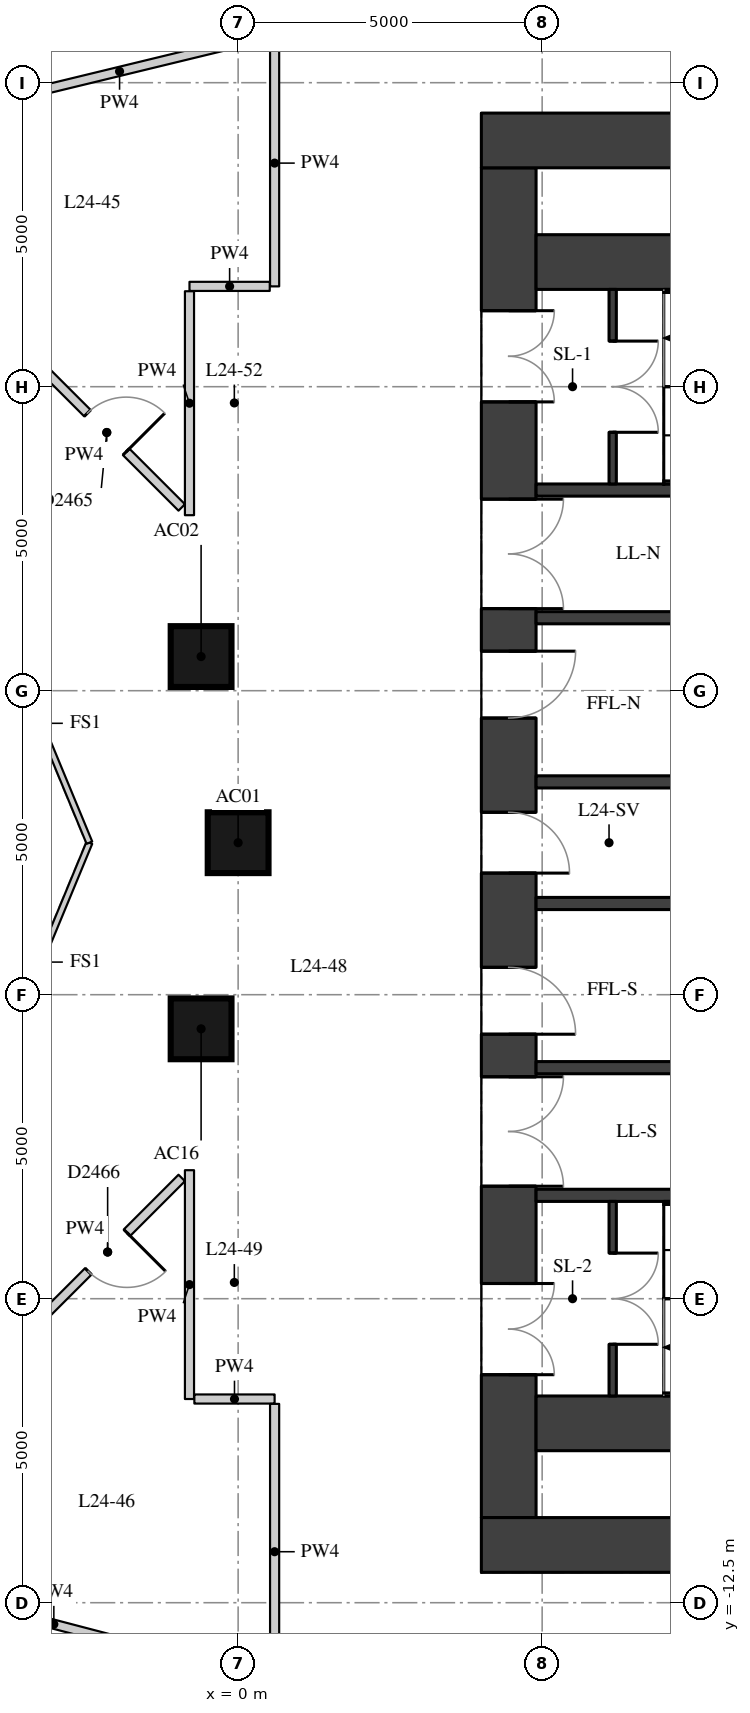
"""IFC4 building model, lengths in metres.
Left out: names, types, materials, properties, quantities, classifications, styles, units other than length and angle.
Written with IfcOpenShell. Run it as: python <this file> out.ifc"""

import sys

from ifc_helpers import new_model, si_unit, direction, frame, frame_2d, origin, origin_2d, place, context, subcontext, project, spatial, rectangle, extrude, element, fill, save


model = new_model("IFC4")
c1 = context("Model", 3, precision=1e-05, world=origin(), true_north=direction((0.0, 1.0)))
c2 = subcontext(c1, "Body", "Model", "MODEL_VIEW")
j1 = project(units=[si_unit("LENGTHUNIT", "METRE"), si_unit("PLANEANGLEUNIT", "RADIAN")], contexts=[c1])
p1 = place(None, origin())
s1 = spatial("IfcSite", under=j1, at=p1, CompositionType="ELEMENT")
p2 = place(p1, origin())
s2 = spatial("IfcBuilding", under=s1, at=p2, CompositionType="ELEMENT")
p3 = place(p2, frame((0.0, 0.0, 88.9)))
s3 = spatial("IfcBuildingStorey", under=s2, at=p3, CompositionType="ELEMENT", Elevation=88.9)
for number, where, z_axis, x_axis in (
    (1, (0.0, 0.0, 0.0), (0.0, 0.0, 1.0), (1.0, 0.0, 0.0)),
    (2, (-0.609, 3.062, 0.0), (0.0, 0.0, 1.0), (1.0, 0.0, 0.0)),
    (3, (-0.609, -3.062, 0.0), (0.0, 0.0, 1.0), (1.0, 0.0, 0.0)),
):
    element("IfcColumn", number, at=place(p3, frame(where, z_axis=z_axis, x_axis=x_axis)), inside=s3, PredefinedType="COLUMN", context=c2, shape_type="SweptSolid", body=[
        extrude(rectangle(XDim=1.0, YDim=1.0, at=origin_2d()), origin(), (0.0, 0.0, 1.0), 3.3),
    ])
p4 = place(p3, frame((4.45, -11.1, 0.0), z_axis=(0.0, 0.0, 1.0), x_axis=(0.0, 1.0, 0.0)))
e4 = element("IfcWall", 4, at=p4, inside=s3, PredefinedType="SHEAR", context=c2, shape_type="SweptSolid", body=[
    extrude(rectangle(XDim=22.2, YDim=0.9, at=frame_2d((11.1, 0.0))), origin(), (0.0, 0.0, 1.0), 3.02),
])
p5 = place(p4, frame((2.35, 0.0, 0.0)))
e5 = element("IfcOpeningElement", 5, at=p5, cuts=e4, PredefinedType="OPENING", context=c2, shape_type="SweptSolid", body=[
    extrude(rectangle(XDim=1.5, YDim=2.1, at=frame_2d((0.75, 1.05))), frame((0.0, 0.46, 0.0), z_axis=(0.0, -1.0, 0.0), x_axis=(1.0, 0.0, 0.0)), (0.0, 0.0, 1.0), 0.92),
])
p6 = place(p4, frame((5.45, 0.0, 0.0)))
e6 = element("IfcOpeningElement", 6, at=p6, cuts=e4, PredefinedType="OPENING", context=c2, shape_type="SweptSolid", body=[
    extrude(rectangle(XDim=1.8, YDim=2.1, at=frame_2d((0.9, 1.05))), frame((0.0, 0.46, 0.0), z_axis=(0.0, -1.0, 0.0), x_axis=(1.0, 0.0, 0.0)), (0.0, 0.0, 1.0), 0.92),
])
p7 = place(p4, frame((7.95, 0.0, 0.0)))
e7 = element("IfcOpeningElement", 7, at=p7, cuts=e4, PredefinedType="OPENING", context=c2, shape_type="SweptSolid", body=[
    extrude(rectangle(XDim=1.1, YDim=2.1, at=frame_2d((0.55, 1.05))), frame((0.0, 0.46, 0.0), z_axis=(0.0, -1.0, 0.0), x_axis=(1.0, 0.0, 0.0)), (0.0, 0.0, 1.0), 0.92),
])
p8 = place(p4, frame((10.6, 0.0, 0.0)))
e8 = element("IfcOpeningElement", 8, at=p8, cuts=e4, PredefinedType="OPENING", context=c2, shape_type="SweptSolid", body=[
    extrude(rectangle(XDim=1.0, YDim=2.1, at=frame_2d((0.5, 1.05))), frame((0.0, 0.46, 0.0), z_axis=(0.0, -1.0, 0.0), x_axis=(1.0, 0.0, 0.0)), (0.0, 0.0, 1.0), 0.92),
])
p9 = place(p4, frame((13.15, 0.0, 0.0)))
e9 = element("IfcOpeningElement", 9, at=p9, cuts=e4, PredefinedType="OPENING", context=c2, shape_type="SweptSolid", body=[
    extrude(rectangle(XDim=1.1, YDim=2.1, at=frame_2d((0.55, 1.05))), frame((0.0, 0.46, 0.0), z_axis=(0.0, -1.0, 0.0), x_axis=(1.0, 0.0, 0.0)), (0.0, 0.0, 1.0), 0.92),
])
p10 = place(p4, frame((14.95, 0.0, 0.0)))
e10 = element("IfcOpeningElement", 10, at=p10, cuts=e4, PredefinedType="OPENING", context=c2, shape_type="SweptSolid", body=[
    extrude(rectangle(XDim=1.8, YDim=2.1, at=frame_2d((0.9, 1.05))), frame((0.0, 0.46, 0.0), z_axis=(0.0, -1.0, 0.0), x_axis=(1.0, 0.0, 0.0)), (0.0, 0.0, 1.0), 0.92),
])
p11 = place(p4, frame((18.35, 0.0, 0.0)))
e11 = element("IfcOpeningElement", 11, at=p11, cuts=e4, PredefinedType="OPENING", context=c2, shape_type="SweptSolid", body=[
    extrude(rectangle(XDim=1.5, YDim=2.1, at=frame_2d((0.75, 1.05))), frame((0.0, 0.46, 0.0), z_axis=(0.0, -1.0, 0.0), x_axis=(1.0, 0.0, 0.0)), (0.0, 0.0, 1.0), 0.92),
])
for number, where, z_axis, x_axis in (
    (12, (4.0, 11.55, 0.0), (0.0, 0.0, 1.0), (1.0, 0.0, 0.0)),
    (13, (4.0, -11.55, 0.0), (0.0, 0.0, 1.0), (1.0, 0.0, 0.0)),
):
    element("IfcWall", number, at=place(p3, frame(where, z_axis=z_axis, x_axis=x_axis)), inside=s3, PredefinedType="SHEAR", context=c2, shape_type="SweptSolid", body=[
        extrude(rectangle(XDim=15.2, YDim=0.9, at=frame_2d((7.6, 0.0))), origin(), (0.0, 0.0, 1.0), 3.02),
    ])
for number, where, z_axis, x_axis in (
    (14, (4.9, 9.55, 0.0), (0.0, 0.0, 1.0), (1.0, 0.0, 0.0)),
    (15, (4.9, -9.55, 0.0), (0.0, 0.0, 1.0), (1.0, 0.0, 0.0)),
):
    element("IfcWall", number, at=place(p3, frame(where, z_axis=z_axis, x_axis=x_axis)), inside=s3, PredefinedType="SHEAR", context=c2, shape_type="SweptSolid", body=[
        extrude(rectangle(XDim=10.2, YDim=0.9, at=frame_2d((5.1, 0.0))), origin(), (0.0, 0.0, 1.0), 3.02),
    ])
p12 = place(p3, frame((4.9, 5.8, 0.0), z_axis=(0.0, 0.0, 1.0), x_axis=(1.0, 0.0, 0.0)))
e16 = element("IfcWall", 16, at=p12, inside=s3, PredefinedType="SHEAR", context=c2, shape_type="SweptSolid", body=[
    extrude(rectangle(XDim=10.2, YDim=0.2, at=frame_2d((5.1, 0.0))), origin(), (0.0, 0.0, 1.0), 3.02),
])
p13 = place(p12, frame((6.75, 0.0, 0.0)))
e17 = element("IfcOpeningElement", 17, at=p13, cuts=e16, PredefinedType="OPENING", context=c2, shape_type="SweptSolid", body=[
    extrude(rectangle(XDim=1.1, YDim=2.1, at=frame_2d((0.55, 1.05))), frame((0.0, 0.11, 0.0), z_axis=(0.0, -1.0, 0.0), x_axis=(1.0, 0.0, 0.0)), (0.0, 0.0, 1.0), 0.22),
])
p14 = place(p12, frame((8.75, 0.0, 0.0)))
e18 = element("IfcOpeningElement", 18, at=p14, cuts=e16, PredefinedType="OPENING", context=c2, shape_type="SweptSolid", body=[
    extrude(rectangle(XDim=1.1, YDim=2.1, at=frame_2d((0.55, 1.05))), frame((0.0, 0.11, 0.0), z_axis=(0.0, -1.0, 0.0), x_axis=(1.0, 0.0, 0.0)), (0.0, 0.0, 1.0), 0.22),
])
p15 = place(p3, frame((4.9, 3.7, 0.0), z_axis=(0.0, 0.0, 1.0), x_axis=(1.0, 0.0, 0.0)))
e19 = element("IfcWall", 19, at=p15, inside=s3, PredefinedType="SHEAR", context=c2, shape_type="SweptSolid", body=[
    extrude(rectangle(XDim=10.2, YDim=0.2, at=frame_2d((5.1, 0.0))), origin(), (0.0, 0.0, 1.0), 3.02),
])
p16 = place(p15, frame((6.3, 0.0, 0.0)))
e20 = element("IfcOpeningElement", 20, at=p16, cuts=e19, PredefinedType="OPENING", context=c2, shape_type="SweptSolid", body=[
    extrude(rectangle(XDim=1.1, YDim=2.1, at=frame_2d((0.55, 1.05))), frame((0.0, 0.11, 0.0), z_axis=(0.0, -1.0, 0.0), x_axis=(1.0, 0.0, 0.0)), (0.0, 0.0, 1.0), 0.22),
])
p17 = place(p15, frame((8.6, 0.0, 0.0)))
e21 = element("IfcOpeningElement", 21, at=p17, cuts=e19, PredefinedType="OPENING", context=c2, shape_type="SweptSolid", body=[
    extrude(rectangle(XDim=1.1, YDim=2.1, at=frame_2d((0.55, 1.05))), frame((0.0, 0.11, 0.0), z_axis=(0.0, -1.0, 0.0), x_axis=(1.0, 0.0, 0.0)), (0.0, 0.0, 1.0), 0.22),
])
for number, where, z_axis, x_axis in (
    (22, (4.9, 1.0, 0.0), (0.0, 0.0, 1.0), (1.0, 0.0, 0.0)),
    (23, (4.9, -1.0, 0.0), (0.0, 0.0, 1.0), (1.0, 0.0, 0.0)),
):
    element("IfcWall", number, at=place(p3, frame(where, z_axis=z_axis, x_axis=x_axis)), inside=s3, PredefinedType="SHEAR", context=c2, shape_type="SweptSolid", body=[
        extrude(rectangle(XDim=10.2, YDim=0.2, at=frame_2d((5.1, 0.0))), origin(), (0.0, 0.0, 1.0), 3.02),
    ])
p18 = place(p3, frame((4.9, -3.7, 0.0), z_axis=(0.0, 0.0, 1.0), x_axis=(1.0, 0.0, 0.0)))
e24 = element("IfcWall", 24, at=p18, inside=s3, PredefinedType="SHEAR", context=c2, shape_type="SweptSolid", body=[
    extrude(rectangle(XDim=10.2, YDim=0.2, at=frame_2d((5.1, 0.0))), origin(), (0.0, 0.0, 1.0), 3.02),
])
p19 = place(p18, frame((6.3, 0.0, 0.0)))
e25 = element("IfcOpeningElement", 25, at=p19, cuts=e24, PredefinedType="OPENING", context=c2, shape_type="SweptSolid", body=[
    extrude(rectangle(XDim=1.1, YDim=2.1, at=frame_2d((0.55, 1.05))), frame((0.0, 0.11, 0.0), z_axis=(0.0, -1.0, 0.0), x_axis=(1.0, 0.0, 0.0)), (0.0, 0.0, 1.0), 0.22),
])
p20 = place(p18, frame((8.6, 0.0, 0.0)))
e26 = element("IfcOpeningElement", 26, at=p20, cuts=e24, PredefinedType="OPENING", context=c2, shape_type="SweptSolid", body=[
    extrude(rectangle(XDim=1.1, YDim=2.1, at=frame_2d((0.55, 1.05))), frame((0.0, 0.11, 0.0), z_axis=(0.0, -1.0, 0.0), x_axis=(1.0, 0.0, 0.0)), (0.0, 0.0, 1.0), 0.22),
])
p21 = place(p3, frame((4.9, -5.8, 0.0), z_axis=(0.0, 0.0, 1.0), x_axis=(1.0, 0.0, 0.0)))
e27 = element("IfcWall", 27, at=p21, inside=s3, PredefinedType="SHEAR", context=c2, shape_type="SweptSolid", body=[
    extrude(rectangle(XDim=10.2, YDim=0.2, at=frame_2d((5.1, 0.0))), origin(), (0.0, 0.0, 1.0), 3.02),
])
p22 = place(p3, frame((6.16, 5.9, 0.0), z_axis=(0.0, 0.0, 1.0), x_axis=(0.0, 1.0, 0.0)))
e28 = element("IfcWall", 28, at=p22, inside=s3, PredefinedType="SHEAR", context=c2, shape_type="SweptSolid", body=[
    extrude(rectangle(XDim=3.2, YDim=0.12, at=frame_2d((1.6, 0.0))), origin(), (0.0, 0.0, 1.0), 3.02),
])
p23 = place(p22, frame((0.85, 0.0, 0.0)))
e29 = element("IfcOpeningElement", 29, at=p23, cuts=e28, PredefinedType="OPENING", context=c2, shape_type="SweptSolid", body=[
    extrude(rectangle(XDim=1.5, YDim=2.1, at=frame_2d((0.75, 1.05))), frame((0.0, 0.07, 0.0), z_axis=(0.0, -1.0, 0.0), x_axis=(1.0, 0.0, 0.0)), (0.0, 0.0, 1.0), 0.14),
])
p24 = place(p3, frame((6.16, -9.1, 0.0), z_axis=(0.0, 0.0, 1.0), x_axis=(0.0, 1.0, 0.0)))
e30 = element("IfcWall", 30, at=p24, inside=s3, PredefinedType="SHEAR", context=c2, shape_type="SweptSolid", body=[
    extrude(rectangle(XDim=3.2, YDim=0.12, at=frame_2d((1.6, 0.0))), origin(), (0.0, 0.0, 1.0), 3.02),
])
p25 = place(p24, frame((0.85, 0.0, 0.0)))
e31 = element("IfcOpeningElement", 31, at=p25, cuts=e30, PredefinedType="OPENING", context=c2, shape_type="SweptSolid", body=[
    extrude(rectangle(XDim=1.5, YDim=2.1, at=frame_2d((0.75, 1.05))), frame((0.0, 0.07, 0.0), z_axis=(0.0, -1.0, 0.0), x_axis=(1.0, 0.0, 0.0)), (0.0, 0.0, 1.0), 0.14),
])
p26 = place(p3, frame((-7.783, 12.916, 0.0), z_axis=(0.0, 0.0, 1.0), x_axis=(0.971770455305, 0.235928341232, 0.0)))
e32 = element("IfcWall", 32, at=p26, inside=s3, PredefinedType="PARTITIONING", context=c2, shape_type="SweptSolid", body=[
    extrude(rectangle(XDim=8.832, YDim=0.2, at=frame_2d((4.416, 0.0))), origin(), (0.0, 0.0, 1.0), 2.42),
])
p27 = place(p26, frame((2.84, 0.0, 0.0)))
e33 = element("IfcOpeningElement", 33, at=p27, cuts=e32, PredefinedType="OPENING", context=c2, shape_type="SweptSolid", body=[
    extrude(rectangle(XDim=1.1, YDim=2.1, at=frame_2d((0.55, 1.05))), frame((0.0, 0.11, 0.0), z_axis=(0.0, -1.0, 0.0), x_axis=(1.0, 0.0, 0.0)), (0.0, 0.0, 1.0), 0.22),
])
p28 = place(p26, frame((0.22, 0.0, 0.0)))
e34 = element("IfcOpeningElement", 34, at=p28, cuts=e32, PredefinedType="OPENING", context=c2, shape_type="SweptSolid", body=[
    extrude(rectangle(XDim=1.8, YDim=2.1, at=frame_2d((0.9, 1.05))), frame((0.0, 0.11, 0.0), z_axis=(0.0, -1.0, 0.0), x_axis=(1.0, 0.0, 0.0)), (0.0, 0.0, 1.0), 0.22),
])
p29 = place(p3, frame((-4.5, 12.067, 0.0), z_axis=(0.0, 0.0, 1.0), x_axis=(0.971799407652, 0.23580905684, 0.0)))
e35 = element("IfcWall", 35, at=p29, inside=s3, PredefinedType="PARTITIONING", context=c2, shape_type="SweptSolid", body=[
    extrude(rectangle(XDim=5.248, YDim=0.15, at=frame_2d((2.624, 0.0))), origin(), (0.0, 0.0, 1.0), 3.02),
])
p30 = place(p3, frame((0.6, 13.205, 0.0), z_axis=(0.0, 0.0, 1.0), x_axis=(0.0, -1.0, 0.0)))
e36 = element("IfcWall", 36, at=p30, inside=s3, PredefinedType="PARTITIONING", context=c2, shape_type="SweptSolid", body=[
    extrude(rectangle(XDim=4.055, YDim=0.15, at=frame_2d((2.027, 0.0))), origin(), (0.0, 0.0, 1.0), 3.02),
])
p31 = place(p3, frame((0.52, 9.15, 0.0), z_axis=(0.0, 0.0, 1.0), x_axis=(-1.0, 0.0, 0.0)))
e37 = element("IfcWall", 37, at=p31, inside=s3, PredefinedType="PARTITIONING", context=c2, shape_type="SweptSolid", body=[
    extrude(rectangle(XDim=1.32, YDim=0.15, at=frame_2d((0.66, 0.0))), origin(), (0.0, 0.0, 1.0), 3.02),
])
p32 = place(p3, frame((-0.8, 9.07, 0.0), z_axis=(0.0, 0.0, 1.0), x_axis=(0.0, -1.0, 0.0)))
e38 = element("IfcWall", 38, at=p32, inside=s3, PredefinedType="PARTITIONING", context=c2, shape_type="SweptSolid", body=[
    extrude(rectangle(XDim=3.683, YDim=0.15, at=frame_2d((1.842, 0.0))), origin(), (0.0, 0.0, 1.0), 3.02),
])
p33 = place(p3, frame((-0.927, 5.514, 0.0), z_axis=(0.0, 0.0, 1.0), x_axis=(-0.707106781187, 0.707106781187, 0.0)))
e39 = element("IfcWall", 39, at=p33, inside=s3, PredefinedType="PARTITIONING", context=c2, shape_type="SweptSolid", body=[
    extrude(rectangle(XDim=3.487, YDim=0.15, at=frame_2d((1.743, 0.0))), origin(), (0.0, 0.0, 1.0), 3.02),
])
p34 = place(p33, frame((1.293, 0.0, 0.0)))
e40 = element("IfcOpeningElement", 40, at=p34, cuts=e39, PredefinedType="OPENING", context=c2, shape_type="SweptSolid", body=[
    extrude(rectangle(XDim=0.9, YDim=2.1, at=frame_2d((0.45, 1.05))), frame((0.0, 0.085, 0.0), z_axis=(0.0, -1.0, 0.0), x_axis=(1.0, 0.0, 0.0)), (0.0, 0.0, 1.0), 0.17),
])
p35 = place(p3, frame((-0.8, -5.386, 0.0), z_axis=(0.0, 0.0, 1.0), x_axis=(0.0, -1.0, 0.0)))
e41 = element("IfcWall", 41, at=p35, inside=s3, PredefinedType="PARTITIONING", context=c2, shape_type="SweptSolid", body=[
    extrude(rectangle(XDim=3.763, YDim=0.15, at=frame_2d((1.882, 0.0))), origin(), (0.0, 0.0, 1.0), 3.02),
])
p36 = place(p3, frame((-0.72, -9.15, 0.0), z_axis=(0.0, 0.0, 1.0), x_axis=(1.0, 0.0, 0.0)))
e42 = element("IfcWall", 42, at=p36, inside=s3, PredefinedType="PARTITIONING", context=c2, shape_type="SweptSolid", body=[
    extrude(rectangle(XDim=1.32, YDim=0.15, at=frame_2d((0.66, 0.0))), origin(), (0.0, 0.0, 1.0), 3.02),
])
p37 = place(p3, frame((0.6, -9.23, 0.0), z_axis=(0.0, 0.0, 1.0), x_axis=(0.0, -1.0, 0.0)))
e43 = element("IfcWall", 43, at=p37, inside=s3, PredefinedType="PARTITIONING", context=c2, shape_type="SweptSolid", body=[
    extrude(rectangle(XDim=4.863, YDim=0.15, at=frame_2d((2.432, 0.0))), origin(), (0.0, 0.0, 1.0), 3.02),
])
p38 = place(p3, frame((-1.644, -13.217, 0.0), z_axis=(0.0, 0.0, 1.0), x_axis=(-0.967446197993, 0.253076774891, 0.0)))
e44 = element("IfcWall", 44, at=p38, inside=s3, PredefinedType="PARTITIONING", context=c2, shape_type="SweptSolid", body=[
    extrude(rectangle(XDim=2.868, YDim=0.15, at=frame_2d((1.434, 0.0))), origin(), (0.0, 0.0, 1.0), 3.02),
])
p39 = place(p3, frame((-3.365, -7.951, 0.0), z_axis=(0.0, 0.0, 1.0), x_axis=(0.707106781187, 0.707106781187, 0.0)))
e45 = element("IfcWall", 45, at=p39, inside=s3, PredefinedType="PARTITIONING", context=c2, shape_type="SweptSolid", body=[
    extrude(rectangle(XDim=3.447, YDim=0.15, at=frame_2d((1.723, 0.0))), origin(), (0.0, 0.0, 1.0), 3.02),
])
p40 = place(p39, frame((1.273, 0.0, 0.0)))
e46 = element("IfcOpeningElement", 46, at=p40, cuts=e45, PredefinedType="OPENING", context=c2, shape_type="SweptSolid", body=[
    extrude(rectangle(XDim=0.9, YDim=2.1, at=frame_2d((0.45, 1.05))), frame((0.0, 0.085, 0.0), z_axis=(0.0, -1.0, 0.0), x_axis=(1.0, 0.0, 0.0)), (0.0, 0.0, 1.0), 0.17),
])
for number, where, z_axis, x_axis in (
    (47, (-2.446, 0.0, 0.0), (0.0, 0.0, 1.0), (-0.383, -0.924, 0.0)),
    (48, (-4.073, 3.927, 0.0), (0.0, 0.0, 1.0), (0.383, -0.924, 0.0)),
):
    element("IfcWall", number, at=place(p3, frame(where, z_axis=z_axis, x_axis=x_axis)), inside=s3, PredefinedType="PARTITIONING", context=c2, shape_type="SweptSolid", body=[
        extrude(rectangle(XDim=4.251, YDim=0.1, at=frame_2d((2.125, 0.0))), origin(), (0.0, 0.0, 1.0), 3.02),
    ])
p41 = place(p5, origin())
e49 = element("IfcDoor", 49, at=p41, inside=s3, OperationType="DOUBLE_DOOR_SINGLE_SWING", PredefinedType="DOOR", context=c2, shape_type="SweptSolid", body=[
    extrude(rectangle(XDim=1.5, YDim=2.1, at=frame_2d((0.75, 1.05))), frame((0.0, 0.025, 0.0), z_axis=(0.0, -1.0, 0.0), x_axis=(1.0, 0.0, 0.0)), (0.0, 0.0, 1.0), 0.05),
])
fill(e5, e49)
p42 = place(p6, origin())
e50 = element("IfcDoor", 50, at=p42, inside=s3, OperationType="DOUBLE_DOOR_SINGLE_SWING", PredefinedType="DOOR", context=c2, shape_type="SweptSolid", body=[
    extrude(rectangle(XDim=1.8, YDim=2.1, at=frame_2d((0.9, 1.05))), frame((0.0, 0.025, 0.0), z_axis=(0.0, -1.0, 0.0), x_axis=(1.0, 0.0, 0.0)), (0.0, 0.0, 1.0), 0.05),
])
fill(e6, e50)
p43 = place(p7, origin())
e51 = element("IfcDoor", 51, at=p43, inside=s3, OperationType="SINGLE_SWING_RIGHT", PredefinedType="DOOR", context=c2, shape_type="SweptSolid", body=[
    extrude(rectangle(XDim=1.1, YDim=2.1, at=frame_2d((0.55, 1.05))), frame((0.0, 0.025, 0.0), z_axis=(0.0, -1.0, 0.0), x_axis=(1.0, 0.0, 0.0)), (0.0, 0.0, 1.0), 0.05),
])
fill(e7, e51)
p44 = place(p8, origin())
e52 = element("IfcDoor", 52, at=p44, inside=s3, OperationType="SINGLE_SWING_RIGHT", PredefinedType="DOOR", context=c2, shape_type="SweptSolid", body=[
    extrude(rectangle(XDim=1.0, YDim=2.1, at=frame_2d((0.5, 1.05))), frame((0.0, 0.025, 0.0), z_axis=(0.0, -1.0, 0.0), x_axis=(1.0, 0.0, 0.0)), (0.0, 0.0, 1.0), 0.05),
])
fill(e8, e52)
p45 = place(p9, origin())
e53 = element("IfcDoor", 53, at=p45, inside=s3, OperationType="SINGLE_SWING_LEFT", PredefinedType="DOOR", context=c2, shape_type="SweptSolid", body=[
    extrude(rectangle(XDim=1.1, YDim=2.1, at=frame_2d((0.55, 1.05))), frame((0.0, 0.025, 0.0), z_axis=(0.0, -1.0, 0.0), x_axis=(1.0, 0.0, 0.0)), (0.0, 0.0, 1.0), 0.05),
])
fill(e9, e53)
p46 = place(p10, origin())
e54 = element("IfcDoor", 54, at=p46, inside=s3, OperationType="DOUBLE_DOOR_SINGLE_SWING", PredefinedType="DOOR", context=c2, shape_type="SweptSolid", body=[
    extrude(rectangle(XDim=1.8, YDim=2.1, at=frame_2d((0.9, 1.05))), frame((0.0, 0.025, 0.0), z_axis=(0.0, -1.0, 0.0), x_axis=(1.0, 0.0, 0.0)), (0.0, 0.0, 1.0), 0.05),
])
fill(e10, e54)
p47 = place(p11, origin())
e55 = element("IfcDoor", 55, at=p47, inside=s3, OperationType="DOUBLE_DOOR_SINGLE_SWING", PredefinedType="DOOR", context=c2, shape_type="SweptSolid", body=[
    extrude(rectangle(XDim=1.5, YDim=2.1, at=frame_2d((0.75, 1.05))), frame((0.0, 0.025, 0.0), z_axis=(0.0, -1.0, 0.0), x_axis=(1.0, 0.0, 0.0)), (0.0, 0.0, 1.0), 0.05),
])
fill(e11, e55)
p48 = place(p23, origin())
e56 = element("IfcDoor", 56, at=p48, inside=s3, OperationType="DOUBLE_DOOR_SINGLE_SWING", PredefinedType="DOOR", context=c2, shape_type="SweptSolid", body=[
    extrude(rectangle(XDim=1.5, YDim=2.1, at=frame_2d((0.75, 1.05))), frame((0.0, 0.025, 0.0), z_axis=(0.0, -1.0, 0.0), x_axis=(1.0, 0.0, 0.0)), (0.0, 0.0, 1.0), 0.05),
])
fill(e29, e56)
p49 = place(p25, origin())
e57 = element("IfcDoor", 57, at=p49, inside=s3, OperationType="DOUBLE_DOOR_SINGLE_SWING", PredefinedType="DOOR", context=c2, shape_type="SweptSolid", body=[
    extrude(rectangle(XDim=1.5, YDim=2.1, at=frame_2d((0.75, 1.05))), frame((0.0, 0.025, 0.0), z_axis=(0.0, -1.0, 0.0), x_axis=(1.0, 0.0, 0.0)), (0.0, 0.0, 1.0), 0.05),
])
fill(e31, e57)
p50 = place(p34, origin())
e58 = element("IfcDoor", 58, at=p50, inside=s3, OperationType="SINGLE_SWING_RIGHT", PredefinedType="DOOR", context=c2, shape_type="SweptSolid", body=[
    extrude(rectangle(XDim=0.9, YDim=2.1, at=frame_2d((0.45, 1.05))), frame((0.0, 0.025, 0.0), z_axis=(0.0, -1.0, 0.0), x_axis=(1.0, 0.0, 0.0)), (0.0, 0.0, 1.0), 0.05),
])
fill(e40, e58)
p51 = place(p40, origin())
e59 = element("IfcDoor", 59, at=p51, inside=s3, OperationType="SINGLE_SWING_LEFT", PredefinedType="DOOR", context=c2, shape_type="SweptSolid", body=[
    extrude(rectangle(XDim=0.9, YDim=2.1, at=frame_2d((0.45, 1.05))), frame((0.0, 0.025, 0.0), z_axis=(0.0, -1.0, 0.0), x_axis=(1.0, 0.0, 0.0)), (0.0, 0.0, 1.0), 0.05),
])
fill(e46, e59)
save(model, sys.argv[1])
